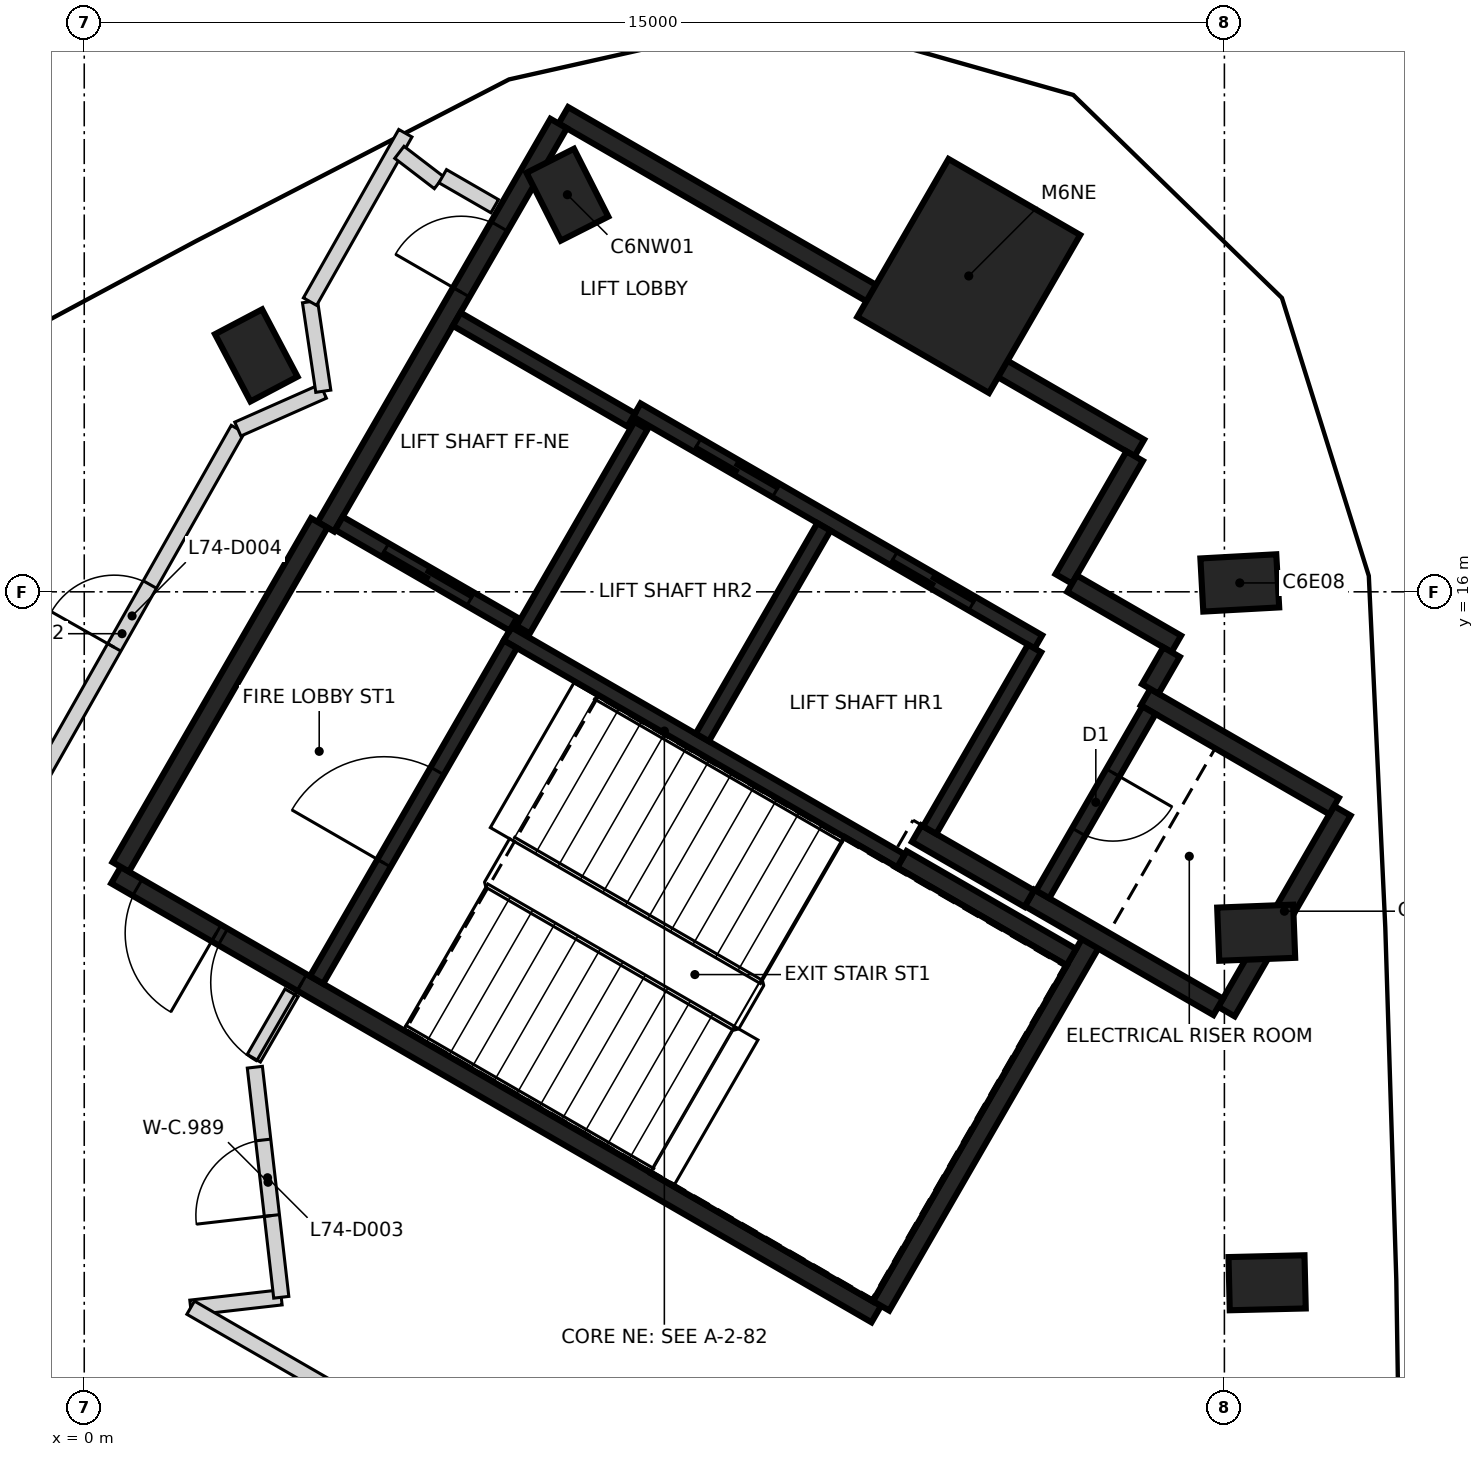
"""IFC4 building model, lengths in metres.
Left out: names, types, materials, properties, quantities, classifications, styles, units other than length and angle.
Written with IfcOpenShell. Run it as: python <this file> out.ifc"""

import sys

from ifc_helpers import new_model, si_unit, direction, frame, frame_2d, origin, origin_2d, place, context, subcontext, project, spatial, rectangle, extrude, element, fill, save


model = new_model("IFC4")
c1 = context("Model", 3, precision=1e-05, world=origin(), true_north=direction((0.0, 1.0)))
c2 = subcontext(c1, "Body", "Model", "MODEL_VIEW")
j1 = project(units=[si_unit("LENGTHUNIT", "METRE"), si_unit("PLANEANGLEUNIT", "RADIAN")], contexts=[c1])
p1 = place(None, origin())
s1 = spatial("IfcSite", under=j1, at=p1, CompositionType="ELEMENT")
p2 = place(p1, origin())
s2 = spatial("IfcBuilding", under=s1, at=p2, CompositionType="ELEMENT")
p3 = place(p2, frame((0.0, 0.0, 294.6)))
s3 = spatial("IfcBuildingStorey", under=s2, at=p3, CompositionType="ELEMENT", Elevation=294.6)
for number, where, z_axis, x_axis in (
    (1, (15.562, 6.91, -0.35), (0.0, 0.0, 1.0), (1.0, 0.024, 0.0)),
    (2, (15.418, 11.515, -0.35), (0.0, 0.0, 1.0), (0.999, 0.039, 0.0)),
    (3, (15.202, 16.117, -0.35), (0.0, 0.0, 1.0), (0.998, 0.055, 0.0)),
    (4, (6.356, 21.224, -0.35), (0.0, 0.0, 1.0), (-0.452, 0.892, 0.0)),
    (5, (2.263, 19.11, -0.35), (0.0, 0.0, 1.0), (-0.466, 0.885, 0.0)),
):
    element("IfcColumn", number, at=place(p3, frame(where, z_axis=z_axis, x_axis=x_axis)), inside=s3, PredefinedType="COLUMN", context=c2, shape_type="SweptSolid", body=[
        extrude(rectangle(XDim=1.0, YDim=0.7, at=origin_2d()), origin(), (0.0, 0.0, 1.0), 3.6),
    ])
p4 = place(p3, frame((11.637, 20.155, -0.35), z_axis=(0.0, 0.0, 1.0), x_axis=(0.5, 0.866025403784, 0.0)))
e6 = element("IfcColumn", 6, at=p4, inside=s3, PredefinedType="COLUMN", context=c2, shape_type="SweptSolid", body=[
    extrude(rectangle(XDim=2.4, YDim=2.0, at=origin_2d()), origin(), (0.0, 0.0, 1.0), 3.6),
])
p5 = place(p3, frame((10.42, 6.498, 0.0), z_axis=(0.0, 0.0, 1.0), x_axis=(-0.866021906294, 0.500006057782, 0.0)))
e7 = element("IfcWall", 7, at=p5, inside=s3, PredefinedType="SHEAR", context=c2, shape_type="SweptSolid", body=[
    extrude(rectangle(XDim=11.55, YDim=0.25, at=frame_2d((5.775, 0.0))), origin(), (0.0, 0.0, 1.0), 3.25),
])
p6 = place(p5, frame((10.025, 0.0, 0.0)))
e8 = element("IfcOpeningElement", 8, at=p6, cuts=e7, PredefinedType="OPENING", context=c2, shape_type="SweptSolid", body=[
    extrude(rectangle(XDim=1.2, YDim=2.1, at=frame_2d((0.6, 1.05))), frame((0.0, 0.135, 0.0), z_axis=(0.0, -1.0, 0.0), x_axis=(1.0, 0.0, 0.0)), (0.0, 0.0, 1.0), 0.27),
])
p7 = place(p5, frame((8.725, 0.0, 0.0)))
e9 = element("IfcOpeningElement", 9, at=p7, cuts=e7, PredefinedType="OPENING", context=c2, shape_type="SweptSolid", body=[
    extrude(rectangle(XDim=1.2, YDim=2.1, at=frame_2d((0.6, 1.05))), frame((0.0, 0.135, 0.0), z_axis=(0.0, -1.0, 0.0), x_axis=(1.0, 0.0, 0.0)), (0.0, 0.0, 1.0), 0.27),
])
p8 = place(p3, frame((6.304, 22.269, 0.0), z_axis=(0.0, 0.0, 1.0), x_axis=(0.866022959057, -0.500004234368, 0.0)))
e10 = element("IfcWall", 10, at=p8, inside=s3, PredefinedType="SHEAR", context=c2, shape_type="SweptSolid", body=[
    extrude(rectangle(XDim=8.75, YDim=0.25, at=frame_2d((4.375, 0.0))), origin(), (0.0, 0.0, 1.0), 3.25),
])
p9 = place(p3, frame((3.179, 16.856, 0.0), z_axis=(0.0, 0.0, 1.0), x_axis=(0.500001955336, 0.866024274868, 0.0)))
e11 = element("IfcWall", 11, at=p9, inside=s3, PredefinedType="SHEAR", context=c2, shape_type="SweptSolid", body=[
    extrude(rectangle(XDim=6.125, YDim=0.25, at=frame_2d((3.062, 0.0))), origin(), (0.0, 0.0, 1.0), 3.25),
])
p10 = place(p9, frame((3.563, 0.0, 0.0)))
e12 = element("IfcOpeningElement", 12, at=p10, cuts=e11, PredefinedType="OPENING", context=c2, shape_type="SweptSolid", body=[
    extrude(rectangle(XDim=1.0, YDim=2.1, at=frame_2d((0.5, 1.05))), frame((0.0, 0.135, 0.0), z_axis=(0.0, -1.0, 0.0), x_axis=(1.0, 0.0, 0.0)), (0.0, 0.0, 1.0), 0.27),
])
p11 = place(p3, frame((0.48, 12.381, 0.0), z_axis=(0.0, 0.0, 1.0), x_axis=(0.49999885962, 0.866026062182, 0.0)))
e13 = element("IfcWall", 13, at=p11, inside=s3, PredefinedType="SHEAR", context=c2, shape_type="SweptSolid", body=[
    extrude(rectangle(XDim=5.225, YDim=0.25, at=frame_2d((2.612, 0.0))), origin(), (0.0, 0.0, 1.0), 3.25),
])
p12 = place(p3, frame((13.238, 11.378, 0.0), z_axis=(0.0, 0.0, 1.0), x_axis=(-0.500008851346, -0.866020293397, 0.0)))
e14 = element("IfcWall", 14, at=p12, inside=s3, PredefinedType="SHEAR", context=c2, shape_type="SweptSolid", body=[
    extrude(rectangle(XDim=5.51, YDim=0.25, at=frame_2d((2.755, 0.0))), origin(), (0.0, 0.0, 1.0), 3.25),
])
p13 = place(p3, frame((16.552, 13.119, 0.0), z_axis=(0.0, 0.0, 1.0), x_axis=(-0.499978833458, -0.866037623948, 0.0)))
e15 = element("IfcWall", 15, at=p13, inside=s3, PredefinedType="SHEAR", context=c2, shape_type="SweptSolid", body=[
    extrude(rectangle(XDim=3.05, YDim=0.25, at=frame_2d((1.525, 0.0))), origin(), (0.0, 0.0, 1.0), 3.25),
])
p14 = place(p3, frame((14.918, 10.54, 0.0), z_axis=(0.0, 0.0, 1.0), x_axis=(-0.866063538972, 0.499933942099, 0.0)))
e16 = element("IfcWall", 16, at=p14, inside=s3, PredefinedType="SHEAR", context=c2, shape_type="SweptSolid", body=[
    extrude(rectangle(XDim=2.865, YDim=0.25, at=frame_2d((1.432, 0.0))), origin(), (0.0, 0.0, 1.0), 3.25),
])
p15 = place(p3, frame((13.963, 14.614, 0.0), z_axis=(0.0, 0.0, 1.0), x_axis=(0.866042235819, -0.499970844928, 0.0)))
e17 = element("IfcWall", 17, at=p15, inside=s3, PredefinedType="SHEAR", context=c2, shape_type="SweptSolid", body=[
    extrude(rectangle(XDim=2.865, YDim=0.25, at=frame_2d((1.432, 0.0))), origin(), (0.0, 0.0, 1.0), 3.25),
])
p16 = place(p3, frame((10.757, 12.481, 0.0), z_axis=(0.0, 0.0, 1.0), x_axis=(0.866022940537, -0.500004266446, 0.0)))
e18 = element("IfcWall", 18, at=p16, inside=s3, PredefinedType="SHEAR", context=c2, shape_type="SweptSolid", body=[
    extrude(rectangle(XDim=2.575, YDim=0.25, at=frame_2d((1.287, 0.0))), origin(), (0.0, 0.0, 1.0), 3.25),
])
p17 = place(p3, frame((13.819, 17.785, 0.0), z_axis=(0.0, 0.0, 1.0), x_axis=(-0.500039802285, -0.866002422705, 0.0)))
e19 = element("IfcWall", 19, at=p17, inside=s3, PredefinedType="SHEAR", context=c2, shape_type="SweptSolid", body=[
    extrude(rectangle(XDim=1.865, YDim=0.25, at=frame_2d((0.932, 0.0))), origin(), (0.0, 0.0, 1.0), 3.25),
])
p18 = place(p3, frame((12.433, 11.964, 0.0), z_axis=(0.0, 0.0, 1.0), x_axis=(-0.866038183914, 0.499977863513, 0.0)))
e20 = element("IfcWall", 20, at=p18, inside=s3, PredefinedType="SHEAR", context=c2, shape_type="SweptSolid", body=[
    extrude(rectangle(XDim=1.71, YDim=0.25, at=frame_2d((0.855, 0.0))), origin(), (0.0, 0.0, 1.0), 3.25),
])
p19 = place(p3, frame((12.995, 16.108, 0.0), z_axis=(0.0, 0.0, 1.0), x_axis=(0.866044474677, -0.49996696679, 0.0)))
e21 = element("IfcWall", 21, at=p19, inside=s3, PredefinedType="SHEAR", context=c2, shape_type="SweptSolid", body=[
    extrude(rectangle(XDim=1.584, YDim=0.25, at=frame_2d((0.792, 0.0))), origin(), (0.0, 0.0, 1.0), 3.25),
])
p20 = place(p3, frame((14.305, 15.207, 0.0), z_axis=(0.0, 0.0, 1.0), x_axis=(-0.499848422343, -0.866112899501, 0.0)))
e22 = element("IfcWall", 22, at=p20, inside=s3, PredefinedType="SHEAR", context=c2, shape_type="SweptSolid", body=[
    extrude(rectangle(XDim=0.559, YDim=0.25, at=frame_2d((0.28, 0.0))), origin(), (0.0, 0.0, 1.0), 3.25),
])
p21 = place(p3, frame((12.552, 15.342, 0.0), z_axis=(0.0, 0.0, 1.0), x_axis=(-0.866030299012, 0.499991521122, 0.0)))
e23 = element("IfcWall", 23, at=p21, inside=s3, PredefinedType="SHEAR", context=c2, shape_type="SweptSolid", body=[
    extrude(rectangle(XDim=6.1, YDim=0.2, at=frame_2d((3.05, 0.0))), origin(), (0.0, 0.0, 1.0), 3.25),
])
p22 = place(p21, frame((1.0, 0.0, 0.0)))
e24 = element("IfcOpeningElement", 24, at=p22, cuts=e23, PredefinedType="OPENING", context=c2, shape_type="SweptSolid", body=[
    extrude(rectangle(XDim=1.2, YDim=2.1, at=frame_2d((0.6, 1.05))), frame((0.0, 0.11, 0.0), z_axis=(0.0, -1.0, 0.0), x_axis=(1.0, 0.0, 0.0)), (0.0, 0.0, 1.0), 0.22),
])
p23 = place(p21, frame((3.982, 0.0, 0.0)))
e25 = element("IfcOpeningElement", 25, at=p23, cuts=e23, PredefinedType="OPENING", context=c2, shape_type="SweptSolid", body=[
    extrude(rectangle(XDim=1.2, YDim=2.1, at=frame_2d((0.6, 1.05))), frame((0.0, 0.11, 0.0), z_axis=(0.0, -1.0, 0.0), x_axis=(1.0, 0.0, 0.0)), (0.0, 0.0, 1.0), 0.22),
])
p24 = place(p3, frame((10.743, 12.46, 0.0), z_axis=(0.0, 0.0, 1.0), x_axis=(-0.866018848283, 0.500011354289, 0.0)))
e26 = element("IfcWall", 26, at=p24, inside=s3, PredefinedType="SHEAR", context=c2, shape_type="SweptSolid", body=[
    extrude(rectangle(XDim=5.974, YDim=0.2, at=frame_2d((2.987, 0.0))), origin(), (0.0, 0.0, 1.0), 3.25),
])
p25 = place(p3, frame((3.057, 10.895, 0.0), z_axis=(0.0, 0.0, 1.0), x_axis=(0.500027839223, 0.866009330205, 0.0)))
e27 = element("IfcWall", 27, at=p25, inside=s3, PredefinedType="SHEAR", context=c2, shape_type="SweptSolid", body=[
    extrude(rectangle(XDim=5.098, YDim=0.2, at=frame_2d((2.549, 0.0))), origin(), (0.0, 0.0, 1.0), 3.25),
])
p26 = place(p25, frame((1.774, 0.0, 0.0)))
e28 = element("IfcOpeningElement", 28, at=p26, cuts=e27, PredefinedType="OPENING", context=c2, shape_type="SweptSolid", body=[
    extrude(rectangle(XDim=1.4, YDim=2.1, at=frame_2d((0.7, 1.05))), frame((0.0, 0.11, 0.0), z_axis=(0.0, -1.0, 0.0), x_axis=(1.0, 0.0, 0.0)), (0.0, 0.0, 1.0), 0.22),
])
p27 = place(p3, frame((8.132, 14.084, 0.0), z_axis=(0.0, 0.0, 1.0), x_axis=(0.500030834389, 0.86600760081, 0.0)))
e29 = element("IfcWall", 29, at=p27, inside=s3, PredefinedType="SHEAR", context=c2, shape_type="SweptSolid", body=[
    extrude(rectangle(XDim=3.198, YDim=0.2, at=frame_2d((1.599, 0.0))), origin(), (0.0, 0.0, 1.0), 3.25),
])
p28 = place(p3, frame((14.008, 14.442, 0.0), z_axis=(0.0, 0.0, 1.0), x_axis=(-0.499986818241, -0.866033014143, 0.0)))
e30 = element("IfcWall", 30, at=p28, inside=s3, PredefinedType="SHEAR", context=c2, shape_type="SweptSolid", body=[
    extrude(rectangle(XDim=2.798, YDim=0.2, at=frame_2d((1.399, 0.0))), origin(), (0.0, 0.0, 1.0), 3.25),
])
p29 = place(p28, frame((0.949, 0.0, 0.0)))
e31 = element("IfcOpeningElement", 31, at=p29, cuts=e30, PredefinedType="OPENING", context=c2, shape_type="SweptSolid", body=[
    extrude(rectangle(XDim=0.9, YDim=2.1, at=frame_2d((0.45, 1.05))), frame((0.0, 0.11, 0.0), z_axis=(0.0, -1.0, 0.0), x_axis=(1.0, 0.0, 0.0)), (0.0, 0.0, 1.0), 0.22),
])
p30 = place(p3, frame((12.502, 15.255, 0.0), z_axis=(0.0, 0.0, 1.0), x_axis=(-0.499965018551, -0.866045599391, 0.0)))
e32 = element("IfcWall", 32, at=p30, inside=s3, PredefinedType="SHEAR", context=c2, shape_type="SweptSolid", body=[
    extrude(rectangle(XDim=2.759, YDim=0.2, at=frame_2d((1.379, 0.0))), origin(), (0.0, 0.0, 1.0), 3.25),
])
p31 = place(p3, frame((7.324, 18.187, 0.0), z_axis=(0.0, 0.0, 1.0), x_axis=(-0.499967891604, -0.866043940782, 0.0)))
e33 = element("IfcWall", 33, at=p31, inside=s3, PredefinedType="SHEAR", context=c2, shape_type="SweptSolid", body=[
    extrude(rectangle(XDim=3.1, YDim=0.2, at=frame_2d((1.55, 0.0))), origin(), (0.0, 0.0, 1.0), 3.25),
])
p32 = place(p3, frame((5.646, 15.576, 0.0), z_axis=(0.0, 0.0, 1.0), x_axis=(-0.866018407898, 0.500012117035, 0.0)))
e34 = element("IfcWall", 34, at=p32, inside=s3, PredefinedType="SHEAR", context=c2, shape_type="SweptSolid", body=[
    extrude(rectangle(XDim=2.651, YDim=0.2, at=frame_2d((1.325, 0.0))), origin(), (0.0, 0.0, 1.0), 3.25),
])
p33 = place(p32, frame((0.652, 0.0, 0.0)))
e35 = element("IfcOpeningElement", 35, at=p33, cuts=e34, PredefinedType="OPENING", context=c2, shape_type="SweptSolid", body=[
    extrude(rectangle(XDim=1.3, YDim=2.1, at=frame_2d((0.65, 1.05))), frame((0.0, 0.11, 0.0), z_axis=(0.0, -1.0, 0.0), x_axis=(1.0, 0.0, 0.0)), (0.0, 0.0, 1.0), 0.22),
])
p34 = place(p3, frame((7.196, 18.26, 0.0), z_axis=(0.0, 0.0, 1.0), x_axis=(-0.866018407898, 0.500012117035, 0.0)))
e36 = element("IfcWall", 36, at=p34, inside=s3, PredefinedType="SHEAR", context=c2, shape_type="SweptSolid", body=[
    extrude(rectangle(XDim=2.651, YDim=0.2, at=frame_2d((1.325, 0.0))), origin(), (0.0, 0.0, 1.0), 3.25),
])
p35 = place(p3, frame((-1.027, 12.757, 0.0), z_axis=(0.0, 0.0, 1.0), x_axis=(0.492663063759, 0.870220147783, 0.0)))
e37 = element("IfcWall", 37, at=p35, inside=s3, PredefinedType="PARTITIONING", context=c2, shape_type="SweptSolid", body=[
    extrude(rectangle(XDim=6.187, YDim=0.2, at=frame_2d((3.094, 0.0))), origin(), (0.0, 0.0, 1.0), 3.25),
])
p36 = place(p35, frame((2.887, 0.0, 0.0)))
e38 = element("IfcOpeningElement", 38, at=p36, cuts=e37, PredefinedType="OPENING", context=c2, shape_type="SweptSolid", body=[
    extrude(rectangle(XDim=0.95, YDim=2.1, at=frame_2d((0.475, 1.05))), frame((0.0, 0.11, 0.0), z_axis=(0.0, -1.0, 0.0), x_axis=(1.0, 0.0, 0.0)), (0.0, 0.0, 1.0), 0.22),
])
p37 = place(p3, frame((1.4, 6.582, 0.0), z_axis=(0.0, 0.0, 1.0), x_axis=(0.993556915844, 0.11333426216, 0.0)))
e39 = element("IfcWall", 39, at=p37, inside=s3, PredefinedType="PARTITIONING", context=c2, shape_type="SweptSolid", body=[
    extrude(rectangle(XDim=1.2, YDim=0.2, at=frame_2d((0.6, 0.0))), origin(), (0.0, 0.0, 1.0), 3.25),
])
p38 = place(p3, frame((1.4, 6.582, 0.0), z_axis=(0.0, 0.0, 1.0), x_axis=(0.866066271601, -0.499929208183, 0.0)))
e40 = element("IfcWall", 40, at=p38, inside=s3, PredefinedType="PARTITIONING", context=c2, shape_type="SweptSolid", body=[
    extrude(rectangle(XDim=2.078, YDim=0.2, at=frame_2d((1.039, 0.0))), origin(), (0.0, 0.0, 1.0), 3.25),
])
p39 = place(p3, frame((2.021, 18.141, 0.0), z_axis=(0.0, 0.0, 1.0), x_axis=(0.914343087003, 0.404940389748, 0.0)))
e41 = element("IfcWall", 41, at=p39, inside=s3, PredefinedType="PARTITIONING", context=c2, shape_type="SweptSolid", body=[
    extrude(rectangle(XDim=1.229, YDim=0.2, at=frame_2d((0.615, 0.0))), origin(), (0.0, 0.0, 1.0), 3.25),
])
p40 = place(p3, frame((2.592, 6.719, 0.0), z_axis=(0.0, 0.0, 1.0), x_axis=(-0.114027951455, 0.993477541914, 0.0)))
e42 = element("IfcWall", 42, at=p40, inside=s3, PredefinedType="PARTITIONING", context=c2, shape_type="SweptSolid", body=[
    extrude(rectangle(XDim=3.047, YDim=0.2, at=frame_2d((1.523, 0.0))), origin(), (0.0, 0.0, 1.0), 3.25),
])
p41 = place(p40, frame((1.083, 0.0, 0.0)))
e43 = element("IfcOpeningElement", 43, at=p41, cuts=e42, PredefinedType="OPENING", context=c2, shape_type="SweptSolid", body=[
    extrude(rectangle(XDim=1.0, YDim=2.1, at=frame_2d((0.5, 1.05))), frame((0.0, 0.11, 0.0), z_axis=(0.0, -1.0, 0.0), x_axis=(1.0, 0.0, 0.0)), (0.0, 0.0, 1.0), 0.22),
])
p42 = place(p3, frame((2.231, 9.864, 0.0), z_axis=(0.0, 0.0, 1.0), x_axis=(0.499942098031, 0.866058830921, 0.0)))
e44 = element("IfcWall", 44, at=p42, inside=s3, PredefinedType="PARTITIONING", context=c2, shape_type="SweptSolid", body=[
    extrude(rectangle(XDim=0.994, YDim=0.2, at=frame_2d((0.497, 0.0))), origin(), (0.0, 0.0, 1.0), 3.25),
])
p43 = place(p3, frame((2.97, 19.817, 0.0), z_axis=(0.0, 0.0, 1.0), x_axis=(0.146986994932, -0.989138424752, 0.0)))
e45 = element("IfcWall", 45, at=p43, inside=s3, PredefinedType="PARTITIONING", context=c2, shape_type="SweptSolid", body=[
    extrude(rectangle(XDim=1.191, YDim=0.2, at=frame_2d((0.595, 0.0))), origin(), (0.0, 0.0, 1.0), 2.35),
])
p44 = place(p3, frame((2.97, 19.818, 0.0), z_axis=(0.0, 0.0, 1.0), x_axis=(0.492727027301, 0.870183932607, 0.0)))
e46 = element("IfcWall", 46, at=p44, inside=s3, PredefinedType="PARTITIONING", context=c2, shape_type="SweptSolid", body=[
    extrude(rectangle(XDim=2.546, YDim=0.2, at=frame_2d((1.273, 0.0))), origin(), (0.0, 0.0, 1.0), 3.25),
])
p45 = place(p3, frame((4.146, 21.782, 0.0), z_axis=(0.0, 0.0, 1.0), x_axis=(0.793977493121, -0.607947152652, 0.0)))
e47 = element("IfcWall", 47, at=p45, inside=s3, PredefinedType="PARTITIONING", context=c2, shape_type="SweptSolid", body=[
    extrude(rectangle(XDim=0.656, YDim=0.2, at=frame_2d((0.328, 0.0))), origin(), (0.0, 0.0, 1.0), 3.25),
])
p46 = place(p3, frame((4.716, 21.468, 0.0), z_axis=(0.0, 0.0, 1.0), x_axis=(0.865912682783, -0.500195187698, 0.0)))
e48 = element("IfcWall", 48, at=p46, inside=s3, PredefinedType="PARTITIONING", context=c2, shape_type="SweptSolid", body=[
    extrude(rectangle(XDim=0.79, YDim=0.2, at=frame_2d((0.395, 0.0))), origin(), (0.0, 0.0, 1.0), 3.25),
])
p47 = place(p33, origin())
e49 = element("IfcDoor", 49, at=p47, inside=s3, OperationType="SLIDING_TO_RIGHT", PredefinedType="DOOR", context=c2, shape_type="SweptSolid", body=[
    extrude(rectangle(XDim=1.3, YDim=2.1, at=frame_2d((0.65, 1.05))), frame((0.0, 0.025, 0.0), z_axis=(0.0, -1.0, 0.0), x_axis=(1.0, 0.0, 0.0)), (0.0, 0.0, 1.0), 0.05),
])
fill(e35, e49)
p48 = place(p22, origin())
e50 = element("IfcDoor", 50, at=p48, inside=s3, OperationType="DOUBLE_DOOR_SLIDING", PredefinedType="DOOR", context=c2, shape_type="SweptSolid", body=[
    extrude(rectangle(XDim=1.2, YDim=2.1, at=frame_2d((0.6, 1.05))), frame((0.0, 0.025, 0.0), z_axis=(0.0, -1.0, 0.0), x_axis=(1.0, 0.0, 0.0)), (0.0, 0.0, 1.0), 0.05),
])
fill(e24, e50)
p49 = place(p23, origin())
e51 = element("IfcDoor", 51, at=p49, inside=s3, OperationType="DOUBLE_DOOR_SLIDING", PredefinedType="DOOR", context=c2, shape_type="SweptSolid", body=[
    extrude(rectangle(XDim=1.2, YDim=2.1, at=frame_2d((0.6, 1.05))), frame((0.0, 0.025, 0.0), z_axis=(0.0, -1.0, 0.0), x_axis=(1.0, 0.0, 0.0)), (0.0, 0.0, 1.0), 0.05),
])
fill(e25, e51)
p50 = place(p10, origin())
e52 = element("IfcDoor", 52, at=p50, inside=s3, OperationType="SINGLE_SWING_LEFT", PredefinedType="DOOR", context=c2, shape_type="SweptSolid", body=[
    extrude(rectangle(XDim=1.0, YDim=2.1, at=frame_2d((0.5, 1.05))), frame((0.0, 0.025, 0.0), z_axis=(0.0, -1.0, 0.0), x_axis=(1.0, 0.0, 0.0)), (0.0, 0.0, 1.0), 0.05),
])
fill(e12, e52)
p51 = place(p6, origin())
e53 = element("IfcDoor", 53, at=p51, inside=s3, OperationType="SINGLE_SWING_LEFT", PredefinedType="DOOR", context=c2, shape_type="SweptSolid", body=[
    extrude(rectangle(XDim=1.2, YDim=2.1, at=frame_2d((0.6, 1.05))), frame((0.0, 0.025, 0.0), z_axis=(0.0, -1.0, 0.0), x_axis=(1.0, 0.0, 0.0)), (0.0, 0.0, 1.0), 0.05),
])
fill(e8, e53)
p52 = place(p7, origin())
e54 = element("IfcDoor", 54, at=p52, inside=s3, OperationType="SINGLE_SWING_RIGHT", PredefinedType="DOOR", context=c2, shape_type="SweptSolid", body=[
    extrude(rectangle(XDim=1.2, YDim=2.1, at=frame_2d((0.6, 1.05))), frame((0.0, 0.025, 0.0), z_axis=(0.0, -1.0, 0.0), x_axis=(1.0, 0.0, 0.0)), (0.0, 0.0, 1.0), 0.05),
])
fill(e9, e54)
p53 = place(p26, origin())
e55 = element("IfcDoor", 55, at=p53, inside=s3, OperationType="SINGLE_SWING_RIGHT", PredefinedType="DOOR", context=c2, shape_type="SweptSolid", body=[
    extrude(rectangle(XDim=1.4, YDim=2.1, at=frame_2d((0.7, 1.05))), frame((0.0, 0.025, 0.0), z_axis=(0.0, -1.0, 0.0), x_axis=(1.0, 0.0, 0.0)), (0.0, 0.0, 1.0), 0.05),
])
fill(e28, e55)
p54 = place(p29, origin())
e56 = element("IfcDoor", 56, at=p54, inside=s3, OperationType="SINGLE_SWING_LEFT", PredefinedType="DOOR", context=c2, shape_type="SweptSolid", body=[
    extrude(rectangle(XDim=0.9, YDim=2.1, at=frame_2d((0.45, 1.05))), frame((0.0, 0.025, 0.0), z_axis=(0.0, -1.0, 0.0), x_axis=(1.0, 0.0, 0.0)), (0.0, 0.0, 1.0), 0.05),
])
fill(e31, e56)
p55 = place(p41, origin())
e57 = element("IfcDoor", 57, at=p55, inside=s3, OperationType="SINGLE_SWING_LEFT", PredefinedType="DOOR", context=c2, shape_type="SweptSolid", body=[
    extrude(rectangle(XDim=1.0, YDim=2.1, at=frame_2d((0.5, 1.05))), frame((0.0, 0.025, 0.0), z_axis=(0.0, -1.0, 0.0), x_axis=(1.0, 0.0, 0.0)), (0.0, 0.0, 1.0), 0.05),
])
fill(e43, e57)
p56 = place(p36, origin())
e58 = element("IfcDoor", 58, at=p56, inside=s3, OperationType="SINGLE_SWING_LEFT", PredefinedType="DOOR", context=c2, shape_type="SweptSolid", body=[
    extrude(rectangle(XDim=0.95, YDim=2.1, at=frame_2d((0.475, 1.05))), frame((0.0, 0.025, 0.0), z_axis=(0.0, -1.0, 0.0), x_axis=(1.0, 0.0, 0.0)), (0.0, 0.0, 1.0), 0.05),
])
fill(e38, e58)
save(model, sys.argv[1])
